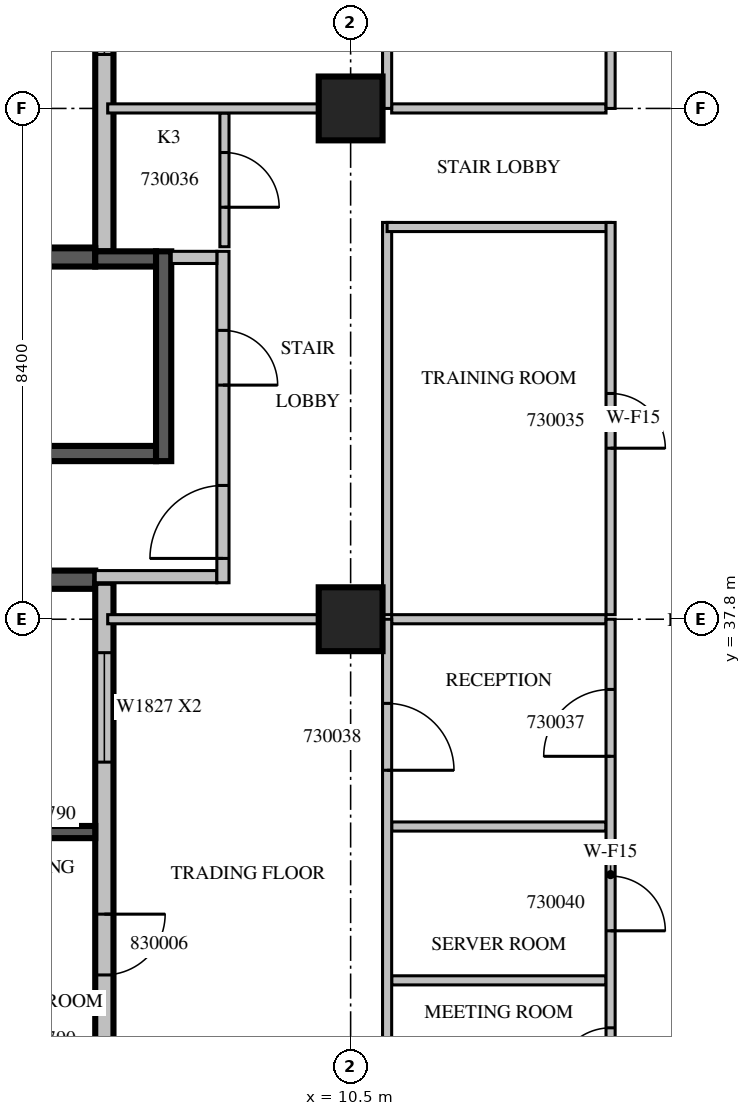
"""IFC4 building model, lengths in metres.
Left out: names, types, materials, properties, quantities, classifications, styles, units other than length and angle.
Written with IfcOpenShell. Run it as: python <this file> out.ifc"""

import sys

from ifc_helpers import new_model, si_unit, direction, frame, frame_2d, origin, origin_2d, place, context, subcontext, project, spatial, rectangle, extrude, source, transform, mapped, element, fill, save


model = new_model("IFC4")
c1 = context("Model", 3, precision=1e-05, world=origin(), true_north=direction((0.0, 1.0)))
c2 = subcontext(c1, "Body", "Model", "MODEL_VIEW")
j1 = project(units=[si_unit("LENGTHUNIT", "METRE"), si_unit("PLANEANGLEUNIT", "RADIAN")], contexts=[c1])
p1 = place(None, origin())
s1 = spatial("IfcSite", under=j1, at=p1, CompositionType="ELEMENT")
p2 = place(p1, origin())
s2 = spatial("IfcBuilding", under=s1, at=p2, CompositionType="ELEMENT")
p3 = place(p2, frame((0.0, 0.0, 137.1)))
s3 = spatial("IfcBuildingStorey", under=s2, at=p3, CompositionType="ELEMENT", Elevation=137.1)
m1 = source(origin(), c2, "Body", "SweptSolid", [
    extrude(rectangle(XDim=1.05, YDim=1.05, at=origin_2d()), origin(), (0.0, 0.0, 1.0), 4.2),
])
for number, where, z_axis, x_axis in (
    (1, (10.5, 37.8, 0.0), (0.0, 0.0, 1.0), (1.0, 0.0, 0.0)),
    (2, (10.5, 46.2, 0.0), (0.0, 0.0, 1.0), (1.0, 0.0, 0.0)),
):
    element("IfcColumn", number, at=place(p3, frame(where, z_axis=z_axis, x_axis=x_axis)), inside=s3, PredefinedType="COLUMN", context=c2, shape_type="MappedRepresentation", body=[
        mapped(m1, transform((0.0, 0.0, 0.0), scale=1.0)),
    ])
m2 = source(origin(), c2, "Body", "SweptSolid", [
    extrude(rectangle(XDim=9.91, YDim=0.3, at=frame_2d((4.955, 0.0))), origin(), (0.0, 0.0, 1.0), 3.8),
])
p4 = place(p3, frame((6.45, 53.76, 0.0), z_axis=(0.0, 0.0, 1.0), x_axis=(0.0, -1.0, 0.0)))
e3 = element("IfcWall", 3, at=p4, inside=s3, PredefinedType="STANDARD", context=c2, shape_type="MappedRepresentation", body=[
    mapped(m2, transform((0.0, 0.0, 0.0), scale=1.0)),
])
m3 = source(origin(), c2, "Body", "SweptSolid", [
    extrude(rectangle(XDim=2.4, YDim=2.7, at=frame_2d((1.2, 1.35))), frame((0.0, 0.16, 0.0), z_axis=(0.0, -1.0, 0.0), x_axis=(1.0, 0.0, 0.0)), (0.0, 0.0, 1.0), 0.32),
])
p5 = place(p4, frame((4.272, 0.0, 0.6)))
e4 = element("IfcOpeningElement", 4, at=p5, cuts=e3, PredefinedType="OPENING", context=c2, shape_type="MappedRepresentation", body=[
    mapped(m3, transform((0.0, 0.0, 0.0), scale=1.0)),
])
p6 = place(p4, frame((0.936, 0.0, 0.6)))
e5 = element("IfcOpeningElement", 5, at=p6, cuts=e3, PredefinedType="OPENING", context=c2, shape_type="MappedRepresentation", body=[
    mapped(m3, transform((0.0, 0.0, 0.0), scale=1.0)),
])
m4 = source(origin(), c2, "Body", "SweptSolid", [
    extrude(rectangle(XDim=6.1, YDim=0.3, at=frame_2d((3.05, 0.0))), origin(), (0.0, 0.0, 1.0), 3.8),
])
for number, where, z_axis, x_axis in (
    (6, (6.3, 43.75, 0.0), (0.0, 0.0, 1.0), (-1.0, 0.0, 0.0)),
    (7, (0.2, 38.45, 0.0), (0.0, 0.0, 1.0), (1.0, 0.0, 0.0)),
):
    element("IfcWall", number, at=place(p3, frame(where, z_axis=z_axis, x_axis=x_axis)), inside=s3, PredefinedType="SOLIDWALL", context=c2, shape_type="MappedRepresentation", body=[
        mapped(m4, transform((0.0, 0.0, 0.0), scale=1.0)),
    ])
m5 = source(origin(), c2, "Body", "SweptSolid", [
    extrude(rectangle(XDim=16.4, YDim=0.3, at=frame_2d((8.2, 0.0))), origin(), (0.0, 0.0, 1.0), 3.8),
])
p7 = place(p3, frame((6.45, 38.4, 0.0), z_axis=(0.0, 0.0, 1.0), x_axis=(0.0, -1.0, 0.0)))
e8 = element("IfcWall", 8, at=p7, inside=s3, PredefinedType="STANDARD", context=c2, shape_type="MappedRepresentation", body=[
    mapped(m5, transform((0.0, 0.0, 0.0), scale=1.0)),
])
m6 = source(origin(), c2, "Body", "SweptSolid", [
    extrude(rectangle(XDim=1.8, YDim=2.7, at=frame_2d((0.9, 1.35))), frame((0.0, 0.16, 0.0), z_axis=(0.0, -1.0, 0.0), x_axis=(1.0, 0.0, 0.0)), (0.0, 0.0, 1.0), 0.32),
])
p8 = place(p7, frame((1.15, 0.0, 0.6)))
e9 = element("IfcOpeningElement", 9, at=p8, cuts=e8, PredefinedType="OPENING", context=c2, shape_type="MappedRepresentation", body=[
    mapped(m6, transform((0.0, 0.0, 0.0), scale=1.0)),
])
p9 = place(p7, frame((9.438, 0.0, 0.6)))
e10 = element("IfcOpeningElement", 10, at=p9, cuts=e8, PredefinedType="OPENING", context=c2, shape_type="MappedRepresentation", body=[
    mapped(m6, transform((0.0, 0.0, 0.0), scale=1.0)),
])
m7 = source(origin(), c2, "Body", "SweptSolid", [
    extrude(rectangle(XDim=3.0, YDim=2.7, at=frame_2d((1.5, 1.35))), frame((0.0, 0.16, 0.0), z_axis=(0.0, -1.0, 0.0), x_axis=(1.0, 0.0, 0.0)), (0.0, 0.0, 1.0), 0.32),
])
p10 = place(p7, frame((12.7, 0.0, 0.6)))
e11 = element("IfcOpeningElement", 11, at=p10, cuts=e8, PredefinedType="OPENING", context=c2, shape_type="MappedRepresentation", body=[
    mapped(m7, transform((0.0, 0.0, 0.0), scale=1.0)),
])
m8 = source(origin(), c2, "Body", "SweptSolid", [
    extrude(rectangle(XDim=1.0, YDim=2.1, at=frame_2d((0.5, 1.05))), frame((0.0, 0.16, 0.0), z_axis=(0.0, -1.0, 0.0), x_axis=(1.0, 0.0, 0.0)), (0.0, 0.0, 1.0), 0.32),
])
p11 = place(p7, frame((5.45, 0.0, 0.0)))
e12 = element("IfcOpeningElement", 12, at=p11, cuts=e8, PredefinedType="OPENING", context=c2, shape_type="MappedRepresentation", body=[
    mapped(m8, transform((0.0, 0.0, 0.0), scale=1.0)),
])
m9 = source(origin(), c2, "Body", "SweptSolid", [
    extrude(rectangle(XDim=2.1, YDim=0.2, at=frame_2d((1.05, 0.0))), origin(), (0.0, 0.0, 1.0), 3.79),
])
p12 = place(p3, frame((6.3, 34.3, 0.0), z_axis=(0.0, 0.0, 1.0), x_axis=(-1.0, 0.0, 0.0)))
e13 = element("IfcWall", 13, at=p12, inside=s3, PredefinedType="SOLIDWALL", context=c2, shape_type="MappedRepresentation", body=[
    mapped(m9, transform((0.0, 0.0, 0.0), scale=1.0)),
])
m10 = source(origin(), c2, "Body", "SweptSolid", [
    extrude(rectangle(XDim=7.0, YDim=0.25, at=frame_2d((3.5, 0.0))), origin(), (0.0, 0.0, 1.0), 3.8),
])
p13 = place(p3, frame((0.3, 40.525, 0.0), z_axis=(0.0, 0.0, 1.0), x_axis=(1.0, 0.0, 0.0)))
e14 = element("IfcWall", 14, at=p13, inside=s3, PredefinedType="SOLIDWALL", context=c2, shape_type="MappedRepresentation", body=[
    mapped(m10, transform((0.0, 0.0, 0.0), scale=1.0)),
])
m11 = source(origin(), c2, "Body", "SweptSolid", [
    extrude(rectangle(XDim=1.1, YDim=2.1, at=frame_2d((0.55, 1.05))), frame((0.0, 0.135, 0.0), z_axis=(0.0, -1.0, 0.0), x_axis=(1.0, 0.0, 0.0)), (0.0, 0.0, 1.0), 0.27),
])
p14 = place(p13, frame((0.55, 0.0, 0.0)))
e15 = element("IfcOpeningElement", 15, at=p14, cuts=e14, PredefinedType="OPENING", context=c2, shape_type="MappedRepresentation", body=[
    mapped(m11, transform((0.0, 0.0, 0.0), scale=1.0)),
])
m12 = source(origin(), c2, "Body", "SweptSolid", [
    extrude(rectangle(XDim=1.0, YDim=0.25, at=frame_2d((0.5, 0.0))), origin(), (0.0, 0.0, 1.0), 3.8),
])
p15 = place(p3, frame((6.3, 43.725, 0.0), z_axis=(0.0, 0.0, 1.0), x_axis=(1.0, 0.0, 0.0)))
e16 = element("IfcWall", 16, at=p15, inside=s3, PredefinedType="SOLIDWALL", context=c2, shape_type="MappedRepresentation", body=[
    mapped(m12, transform((0.0, 0.0, 0.0), scale=1.0)),
])
m13 = source(origin(), c2, "Body", "SweptSolid", [
    extrude(rectangle(XDim=3.45, YDim=0.25, at=frame_2d((1.725, 0.0))), origin(), (0.0, 0.0, 1.0), 3.8),
])
p16 = place(p3, frame((7.425, 40.4, 0.0), z_axis=(0.0, 0.0, 1.0), x_axis=(0.0, 1.0, 0.0)))
e17 = element("IfcWall", 17, at=p16, inside=s3, PredefinedType="SOLIDWALL", context=c2, shape_type="MappedRepresentation", body=[
    mapped(m13, transform((0.0, 0.0, 0.0), scale=1.0)),
])
m14 = source(origin(), c2, "Body", "SweptSolid", [
    extrude(rectangle(XDim=2.0, YDim=0.2, at=frame_2d((1.0, 0.0))), origin(), (0.0, 0.0, 1.0), 3.8),
])
p17 = place(p3, frame((6.3, 38.5, 0.0), z_axis=(0.0, 0.0, 1.0), x_axis=(1.0, 0.0, 0.0)))
e18 = element("IfcWall", 18, at=p17, inside=s3, PredefinedType="PARTITIONING", context=c2, shape_type="MappedRepresentation", body=[
    mapped(m14, transform((0.0, 0.0, 0.0), scale=1.0)),
])
m15 = source(origin(), c2, "Body", "SweptSolid", [
    extrude(rectangle(XDim=5.45, YDim=0.2, at=frame_2d((2.725, 0.0))), origin(), (0.0, 0.0, 1.0), 3.8),
])
p18 = place(p3, frame((8.4, 38.4, 0.0), z_axis=(0.0, 0.0, 1.0), x_axis=(0.0, 1.0, 0.0)))
e19 = element("IfcWall", 19, at=p18, inside=s3, PredefinedType="PARTITIONING", context=c2, shape_type="MappedRepresentation", body=[
    mapped(m15, transform((0.0, 0.0, 0.0), scale=1.0)),
])
m16 = source(origin(), c2, "Body", "SweptSolid", [
    extrude(rectangle(XDim=1.2, YDim=2.1, at=frame_2d((0.6, 1.05))), frame((0.0, 0.11, 0.0), z_axis=(0.0, -1.0, 0.0), x_axis=(1.0, 0.0, 0.0)), (0.0, 0.0, 1.0), 0.22),
])
p19 = place(p18, frame((0.4, 0.0, 0.0)))
e20 = element("IfcOpeningElement", 20, at=p19, cuts=e19, PredefinedType="OPENING", context=c2, shape_type="MappedRepresentation", body=[
    mapped(m16, transform((0.0, 0.0, 0.0), scale=1.0)),
])
m17 = source(origin(), c2, "Body", "SweptSolid", [
    extrude(rectangle(XDim=0.9, YDim=2.1, at=frame_2d((0.45, 1.05))), frame((0.0, 0.11, 0.0), z_axis=(0.0, -1.0, 0.0), x_axis=(1.0, 0.0, 0.0)), (0.0, 0.0, 1.0), 0.22),
])
p20 = place(p18, frame((3.25, 0.0, 0.0)))
e21 = element("IfcOpeningElement", 21, at=p20, cuts=e19, PredefinedType="OPENING", context=c2, shape_type="MappedRepresentation", body=[
    mapped(m17, transform((0.0, 0.0, 0.0), scale=1.0)),
])
m18 = source(origin(), c2, "Body", "SweptSolid", [
    extrude(rectangle(XDim=0.75, YDim=0.2, at=frame_2d((0.375, 0.0))), origin(), (0.0, 0.0, 1.0), 3.8),
])
p21 = place(p3, frame((7.55, 43.75, 0.0), z_axis=(0.0, 0.0, 1.0), x_axis=(1.0, 0.0, 0.0)))
e22 = element("IfcWall", 22, at=p21, inside=s3, PredefinedType="PARTITIONING", context=c2, shape_type="MappedRepresentation", body=[
    mapped(m18, transform((0.0, 0.0, 0.0), scale=1.0)),
])
m19 = source(origin(), c2, "Body", "SweptSolid", [
    extrude(rectangle(XDim=6.45, YDim=0.15, at=frame_2d((3.225, 0.0))), origin(), (0.0, 0.0, 1.0), 3.8),
])
p22 = place(p3, frame((11.1, 44.325, 0.0), z_axis=(0.0, 0.0, 1.0), x_axis=(0.0, -1.0, 0.0)))
e23 = element("IfcWall", 23, at=p22, inside=s3, PredefinedType="PARTITIONING", context=c2, shape_type="MappedRepresentation", body=[
    mapped(m19, transform((0.0, 0.0, 0.0), scale=1.0)),
])
m20 = source(origin(), c2, "Body", "SweptSolid", [
    extrude(rectangle(XDim=3.675, YDim=0.15, at=frame_2d((1.837, 0.0))), origin(), (0.0, 0.0, 1.0), 3.8),
])
p23 = place(p3, frame((14.775, 44.25, 0.0), z_axis=(0.0, 0.0, 1.0), x_axis=(-1.0, 0.0, 0.0)))
e24 = element("IfcWall", 24, at=p23, inside=s3, PredefinedType="PARTITIONING", context=c2, shape_type="MappedRepresentation", body=[
    mapped(m20, transform((0.0, 0.0, 0.0), scale=1.0)),
])
p24 = place(p3, frame((14.775, 37.875, 0.0), z_axis=(0.0, 0.0, 1.0), x_axis=(0.0, 1.0, 0.0)))
e25 = element("IfcWall", 25, at=p24, inside=s3, PredefinedType="PARTITIONING", context=c2, shape_type="MappedRepresentation", body=[
    mapped(m19, transform((0.0, 0.0, 0.0), scale=1.0)),
])
m21 = source(origin(), c2, "Body", "SweptSolid", [
    extrude(rectangle(XDim=0.9, YDim=2.1, at=frame_2d((0.45, 1.05))), frame((0.0, 0.085, 0.0), z_axis=(0.0, -1.0, 0.0), x_axis=(1.0, 0.0, 0.0)), (0.0, 0.0, 1.0), 0.17),
])
p25 = place(p24, frame((2.737, 0.0, 0.0)))
e26 = element("IfcOpeningElement", 26, at=p25, cuts=e25, PredefinedType="OPENING", context=c2, shape_type="MappedRepresentation", body=[
    mapped(m21, transform((0.0, 0.0, 0.0), scale=1.0)),
])
m22 = source(origin(), c2, "Body", "SweptSolid", [
    extrude(rectangle(XDim=2.2, YDim=0.15, at=frame_2d((1.1, 0.0))), origin(), (0.0, 0.0, 1.0), 3.8),
])
p26 = place(p3, frame((8.425, 43.925, 0.0), z_axis=(0.0, 0.0, 1.0), x_axis=(0.0, 1.0, 0.0)))
e27 = element("IfcWall", 27, at=p26, inside=s3, PredefinedType="PARTITIONING", context=c2, shape_type="MappedRepresentation", body=[
    mapped(m22, transform((0.0, 0.0, 0.0), scale=1.0)),
])
p27 = place(p26, frame((0.65, 0.0, 0.0)))
e28 = element("IfcOpeningElement", 28, at=p27, cuts=e27, PredefinedType="OPENING", context=c2, shape_type="MappedRepresentation", body=[
    mapped(m21, transform((0.0, 0.0, 0.0), scale=1.0)),
])
m23 = source(origin(), c2, "Body", "SweptSolid", [
    extrude(rectangle(XDim=3.525, YDim=0.15, at=frame_2d((1.762, 0.0))), origin(), (0.0, 0.0, 1.0), 3.8),
])
for number, where, z_axis, x_axis in (
    (29, (14.7, 31.861, 0.0), (0.0, 0.0, 1.0), (-1.0, 0.0, 0.0)),
    (30, (14.7, 34.391, 0.0), (0.0, 0.0, 1.0), (-1.0, 0.0, 0.0)),
):
    element("IfcWall", number, at=place(p3, frame(where, z_axis=z_axis, x_axis=x_axis)), inside=s3, PredefinedType="PARTITIONING", context=c2, shape_type="MappedRepresentation", body=[
        mapped(m23, transform((0.0, 0.0, 0.0), scale=1.0)),
    ])
m24 = source(origin(), c2, "Body", "SweptSolid", [
    extrude(rectangle(XDim=3.471, YDim=0.15, at=frame_2d((1.736, 0.0))), origin(), (0.0, 0.0, 1.0), 3.8),
])
p28 = place(p3, frame((9.976, 37.8, 0.0), z_axis=(0.0, 0.0, 1.0), x_axis=(-1.0, 0.0, 0.0)))
e31 = element("IfcWall", 31, at=p28, inside=s3, PredefinedType="PARTITIONING", context=c2, shape_type="MappedRepresentation", body=[
    mapped(m24, transform((0.0, 0.0, 0.0), scale=1.0)),
])
p29 = place(p3, frame((14.7, 37.8, 0.0), z_axis=(0.0, 0.0, 1.0), x_axis=(-1.0, 0.0, 0.0)))
e32 = element("IfcWall", 32, at=p29, inside=s3, PredefinedType="PARTITIONING", context=c2, shape_type="MappedRepresentation", body=[
    mapped(m23, transform((0.0, 0.0, 0.0), scale=1.0)),
])
m25 = source(origin(), c2, "Body", "SweptSolid", [
    extrude(rectangle(XDim=8.4, YDim=0.15, at=frame_2d((4.2, 0.0))), origin(), (0.0, 0.0, 1.0), 3.8),
])
p30 = place(p3, frame((11.1, 29.4, 0.0), z_axis=(0.0, 0.0, 1.0), x_axis=(0.0, 1.0, 0.0)))
e33 = element("IfcWall", 33, at=p30, inside=s3, PredefinedType="PARTITIONING", context=c2, shape_type="MappedRepresentation", body=[
    mapped(m25, transform((0.0, 0.0, 0.0), scale=1.0)),
])
m26 = source(origin(), c2, "Body", "SweptSolid", [
    extrude(rectangle(XDim=1.1, YDim=2.1, at=frame_2d((0.55, 1.05))), frame((0.0, 0.085, 0.0), z_axis=(0.0, -1.0, 0.0), x_axis=(1.0, 0.0, 0.0)), (0.0, 0.0, 1.0), 0.17),
])
p31 = place(p30, frame((5.916, 0.0, 0.0)))
e34 = element("IfcOpeningElement", 34, at=p31, cuts=e33, PredefinedType="OPENING", context=c2, shape_type="MappedRepresentation", body=[
    mapped(m26, transform((0.0, 0.0, 0.0), scale=1.0)),
])
p32 = place(p3, frame((9.976, 46.2, 0.0), z_axis=(0.0, 0.0, 1.0), x_axis=(-1.0, 0.0, 0.0)))
e35 = element("IfcWall", 35, at=p32, inside=s3, PredefinedType="PARTITIONING", context=c2, shape_type="MappedRepresentation", body=[
    mapped(m24, transform((0.0, 0.0, 0.0), scale=1.0)),
])
p33 = place(p3, frame((14.7, 46.2, 0.0), z_axis=(0.0, 0.0, 1.0), x_axis=(-1.0, 0.0, 0.0)))
e36 = element("IfcWall", 36, at=p33, inside=s3, PredefinedType="PARTITIONING", context=c2, shape_type="MappedRepresentation", body=[
    mapped(m23, transform((0.0, 0.0, 0.0), scale=1.0)),
])
m27 = source(origin(), c2, "Body", "SweptSolid", [
    extrude(rectangle(XDim=7.26, YDim=0.15, at=frame_2d((3.63, 0.0))), origin(), (0.0, 0.0, 1.0), 3.8),
])
p34 = place(p3, frame((11.1, 46.2, 0.0), z_axis=(0.0, 0.0, 1.0), x_axis=(0.0, 1.0, 0.0)))
e37 = element("IfcWall", 37, at=p34, inside=s3, PredefinedType="PARTITIONING", context=c2, shape_type="MappedRepresentation", body=[
    mapped(m27, transform((0.0, 0.0, 0.0), scale=1.0)),
])
p35 = place(p34, frame((1.715, 0.0, 0.0)))
e38 = element("IfcOpeningElement", 38, at=p35, cuts=e37, PredefinedType="OPENING", context=c2, shape_type="MappedRepresentation", body=[
    mapped(m21, transform((0.0, 0.0, 0.0), scale=1.0)),
])
p36 = place(p34, frame((4.155, 0.0, 0.0)))
e39 = element("IfcOpeningElement", 39, at=p36, cuts=e37, PredefinedType="OPENING", context=c2, shape_type="MappedRepresentation", body=[
    mapped(m21, transform((0.0, 0.0, 0.0), scale=1.0)),
])
p37 = place(p3, frame((14.775, 29.4, 0.0), z_axis=(0.0, 0.0, 1.0), x_axis=(0.0, 1.0, 0.0)))
e40 = element("IfcWall", 40, at=p37, inside=s3, PredefinedType="PARTITIONING", context=c2, shape_type="MappedRepresentation", body=[
    mapped(m25, transform((0.0, 0.0, 0.0), scale=1.0)),
])
p38 = place(p37, frame((6.146, 0.0, 0.0)))
e41 = element("IfcOpeningElement", 41, at=p38, cuts=e40, PredefinedType="OPENING", context=c2, shape_type="MappedRepresentation", body=[
    mapped(m26, transform((0.0, 0.0, 0.0), scale=1.0)),
])
p39 = place(p37, frame((0.781, 0.0, 0.0)))
e42 = element("IfcOpeningElement", 42, at=p39, cuts=e40, PredefinedType="OPENING", context=c2, shape_type="MappedRepresentation", body=[
    mapped(m21, transform((0.0, 0.0, 0.0), scale=1.0)),
])
p40 = place(p37, frame((3.276, 0.0, 0.0)))
e43 = element("IfcOpeningElement", 43, at=p40, cuts=e40, PredefinedType="OPENING", context=c2, shape_type="MappedRepresentation", body=[
    mapped(m21, transform((0.0, 0.0, 0.0), scale=1.0)),
])
p41 = place(p3, frame((14.775, 46.2, 0.0), z_axis=(0.0, 0.0, 1.0), x_axis=(0.0, 1.0, 0.0)))
e44 = element("IfcWall", 44, at=p41, inside=s3, PredefinedType="PARTITIONING", context=c2, shape_type="MappedRepresentation", body=[
    mapped(m27, transform((0.0, 0.0, 0.0), scale=1.0)),
])
m28 = source(origin(), c2, "Body", "SweptSolid", [
    extrude(rectangle(XDim=1.2, YDim=2.1, at=frame_2d((0.6, 1.05))), frame((0.0, 0.085, 0.0), z_axis=(0.0, -1.0, 0.0), x_axis=(1.0, 0.0, 0.0)), (0.0, 0.0, 1.0), 0.17),
])
p42 = place(p41, frame((3.067, 0.0, 0.0)))
e45 = element("IfcOpeningElement", 45, at=p42, cuts=e44, PredefinedType="OPENING", context=c2, shape_type="MappedRepresentation", body=[
    mapped(m28, transform((0.0, 0.0, 0.0), scale=1.0)),
])
m29 = source(origin(), c2, "Body", "SweptSolid", [
    extrude(rectangle(XDim=2.4, YDim=2.7, at=frame_2d((1.2, 1.35))), frame((0.0, 0.03, 0.0), z_axis=(0.0, -1.0, 0.0), x_axis=(1.0, 0.0, 0.0)), (0.0, 0.0, 1.0), 0.06),
])
p43 = place(p5, origin())
e46 = element("IfcWindow", 46, at=p43, inside=s3, PartitioningType="SINGLE_PANEL", PredefinedType="WINDOW", context=c2, shape_type="MappedRepresentation", body=[
    mapped(m29, transform((0.0, 0.0, 0.0), scale=1.0)),
])
fill(e4, e46)
m30 = source(origin(), c2, "Body", "SweptSolid", [
    extrude(rectangle(XDim=1.8, YDim=2.7, at=frame_2d((0.9, 1.35))), frame((0.0, 0.03, 0.0), z_axis=(0.0, -1.0, 0.0), x_axis=(1.0, 0.0, 0.0)), (0.0, 0.0, 1.0), 0.06),
])
p44 = place(p8, origin())
e47 = element("IfcWindow", 47, at=p44, inside=s3, PartitioningType="SINGLE_PANEL", PredefinedType="WINDOW", context=c2, shape_type="MappedRepresentation", body=[
    mapped(m30, transform((0.0, 0.0, 0.0), scale=1.0)),
])
fill(e9, e47)
m31 = source(origin(), c2, "Body", "SweptSolid", [
    extrude(rectangle(XDim=1.2, YDim=2.1, at=frame_2d((0.6, 1.05))), frame((0.0, 0.025, 0.0), z_axis=(0.0, -1.0, 0.0), x_axis=(1.0, 0.0, 0.0)), (0.0, 0.0, 1.0), 0.05),
])
p45 = place(p19, origin())
e48 = element("IfcDoor", 48, at=p45, inside=s3, OperationType="SINGLE_SWING_LEFT", PredefinedType="DOOR", context=c2, shape_type="MappedRepresentation", body=[
    mapped(m31, transform((0.0, 0.0, 0.0), scale=1.0)),
])
fill(e20, e48)
m32 = source(origin(), c2, "Body", "SweptSolid", [
    extrude(rectangle(XDim=0.9, YDim=2.1, at=frame_2d((0.45, 1.05))), frame((0.0, 0.025, 0.0), z_axis=(0.0, -1.0, 0.0), x_axis=(1.0, 0.0, 0.0)), (0.0, 0.0, 1.0), 0.05),
])
p46 = place(p20, origin())
e49 = element("IfcDoor", 49, at=p46, inside=s3, OperationType="SINGLE_SWING_RIGHT", PredefinedType="DOOR", context=c2, shape_type="MappedRepresentation", body=[
    mapped(m32, transform((0.0, 0.0, 0.0), scale=1.0)),
])
fill(e21, e49)
p47 = place(p25, origin())
e50 = element("IfcDoor", 50, at=p47, inside=s3, OperationType="SINGLE_SWING_RIGHT", PredefinedType="DOOR", context=c2, shape_type="MappedRepresentation", body=[
    mapped(m32, transform((0.0, 0.0, 0.0), scale=1.0)),
])
fill(e26, e50)
p48 = place(p27, origin())
e51 = element("IfcDoor", 51, at=p48, inside=s3, OperationType="SINGLE_SWING_RIGHT", PredefinedType="DOOR", context=c2, shape_type="MappedRepresentation", body=[
    mapped(m32, transform((0.0, 0.0, 0.0), scale=1.0)),
])
fill(e28, e51)
m33 = source(origin(), c2, "Body", "SweptSolid", [
    extrude(rectangle(XDim=1.1, YDim=2.1, at=frame_2d((0.55, 1.05))), frame((0.0, 0.025, 0.0), z_axis=(0.0, -1.0, 0.0), x_axis=(1.0, 0.0, 0.0)), (0.0, 0.0, 1.0), 0.05),
])
p49 = place(p38, origin())
e52 = element("IfcDoor", 52, at=p49, inside=s3, OperationType="SINGLE_SWING_LEFT", PredefinedType="DOOR", context=c2, shape_type="MappedRepresentation", body=[
    mapped(m33, transform((0.0, 0.0, 0.0), scale=1.0)),
])
fill(e41, e52)
p50 = place(p31, origin())
e53 = element("IfcDoor", 53, at=p50, inside=s3, OperationType="SINGLE_SWING_RIGHT", PredefinedType="DOOR", context=c2, shape_type="MappedRepresentation", body=[
    mapped(m33, transform((0.0, 0.0, 0.0), scale=1.0)),
])
fill(e34, e53)
p51 = place(p39, origin())
e54 = element("IfcDoor", 54, at=p51, inside=s3, OperationType="SINGLE_SWING_LEFT", PredefinedType="DOOR", context=c2, shape_type="MappedRepresentation", body=[
    mapped(m32, transform((0.0, 0.0, 0.0), scale=1.0)),
])
fill(e42, e54)
p52 = place(p40, origin())
e55 = element("IfcDoor", 55, at=p52, inside=s3, OperationType="SINGLE_SWING_RIGHT", PredefinedType="DOOR", context=c2, shape_type="MappedRepresentation", body=[
    mapped(m32, transform((0.0, 0.0, 0.0), scale=1.0)),
])
fill(e43, e55)
m34 = source(origin(), c2, "Body", "SweptSolid", [
    extrude(rectangle(XDim=1.0, YDim=2.1, at=frame_2d((0.5, 1.05))), frame((0.0, 0.025, 0.0), z_axis=(0.0, -1.0, 0.0), x_axis=(1.0, 0.0, 0.0)), (0.0, 0.0, 1.0), 0.05),
])
p53 = place(p11, origin())
e56 = element("IfcDoor", 56, at=p53, inside=s3, OperationType="SINGLE_SWING_LEFT", PredefinedType="DOOR", context=c2, shape_type="MappedRepresentation", body=[
    mapped(m34, transform((0.0, 0.0, 0.0), scale=1.0)),
])
fill(e12, e56)
save(model, sys.argv[1])
